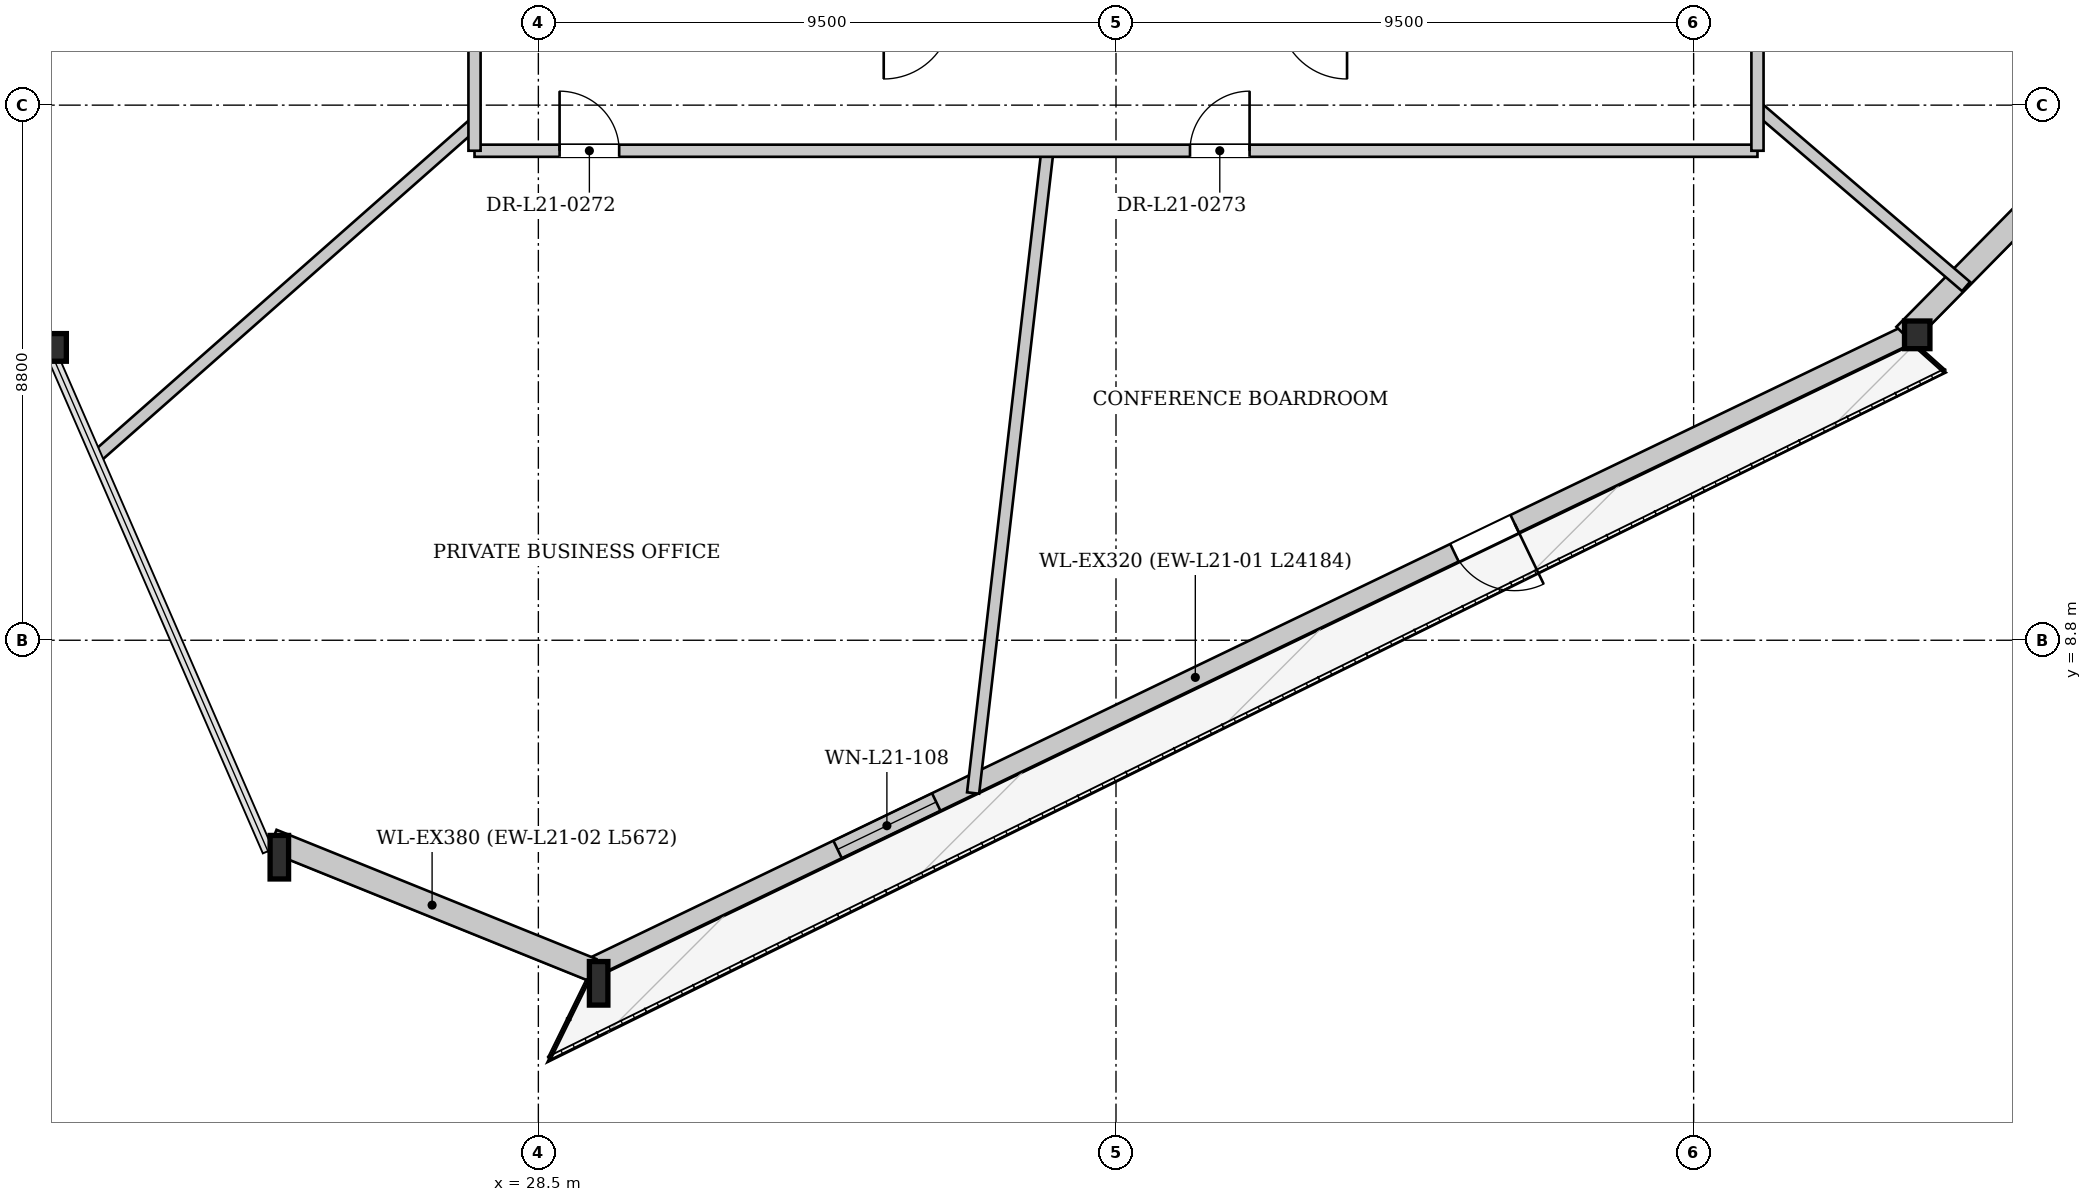
"""IFC4 building model, lengths in metres.
Left out: names, types, materials, properties, quantities, classifications, styles, units other than length and angle.
Written with IfcOpenShell. Run it as: python <this file> out.ifc"""

import sys

from ifc_helpers import new_model, si_unit, direction, frame, frame_2d, origin, origin_2d, place, context, subcontext, project, spatial, rectangle, i_section, extrude, source, transform, mapped, element, fill, save


model = new_model("IFC4")
c1 = context("Model", 3, precision=1e-05, world=origin(), true_north=direction((0.0, 1.0)))
c2 = subcontext(c1, "Body", "Model", "MODEL_VIEW")
j1 = project(units=[si_unit("LENGTHUNIT", "METRE"), si_unit("PLANEANGLEUNIT", "RADIAN")], contexts=[c1])
p1 = place(None, origin())
s1 = spatial("IfcSite", under=j1, at=p1, CompositionType="ELEMENT")
p2 = place(p1, origin())
s2 = spatial("IfcBuilding", under=s1, at=p2, CompositionType="ELEMENT")
p3 = place(p2, frame((0.0, 0.0, 84.4)))
s3 = spatial("IfcBuildingStorey", under=s2, at=p3, CompositionType="ELEMENT", Elevation=84.4)
m1 = source(origin(), c2, "Body", "SweptSolid", [
    extrude(i_section(OverallWidth=0.418, OverallDepth=0.455, WebThickness=0.038, FlangeThickness=0.059, at=origin_2d()), origin(), (0.0, 0.0, 1.0), 3.405),
])
p4 = place(p3, frame((20.393, 13.743, 0.0), z_axis=(0.079506863503, -0.07491855037, 0.994015024769), x_axis=(0.685794461716, 0.727795270855, 0.0)))
e1 = element("IfcColumn", 1, at=p4, inside=s3, PredefinedType="COLUMN", context=c2, shape_type="MappedRepresentation", body=[
    mapped(m1, transform((0.0, 0.0, 0.0), x_axis=(1.0, 0.0, 0.0), y_axis=(0.0, 1.0, 0.0), z_axis=(0.0, 0.0, 1.0), scale=1.0)),
])
m2 = source(origin(), c2, "Body", "SweptSolid", [
    extrude(i_section(OverallWidth=0.304, OverallDepth=0.716, WebThickness=0.021, FlangeThickness=0.04, at=origin_2d()), origin(), (0.0, 0.0, 1.0), 3.412),
])
p5 = place(p3, frame((24.052, 5.331, 0.0), z_axis=(0.110350236262, -0.057608262121, 0.9922218066), x_axis=(0.462782108562, 0.886472063855, 0.0)))
e2 = element("IfcColumn", 2, at=p5, inside=s3, PredefinedType="COLUMN", context=c2, shape_type="MappedRepresentation", body=[
    mapped(m2, transform((0.0, 0.0, 0.0), x_axis=(1.0, 0.0, 0.0), y_axis=(0.0, 1.0, 0.0), z_axis=(0.0, 0.0, 1.0), scale=1.0)),
])
m3 = source(origin(), c2, "Body", "SweptSolid", [
    extrude(i_section(OverallWidth=0.304, OverallDepth=0.716, WebThickness=0.021, FlangeThickness=0.04, at=origin_2d()), origin(), (0.0, 0.0, 1.0), 3.406),
])
p6 = place(p3, frame((29.311, 3.206, 0.0), z_axis=(0.106170006888, -0.027958340774, 0.993954858542), x_axis=(0.254653998103, 0.967032233822, 0.0)))
e3 = element("IfcColumn", 3, at=p6, inside=s3, PredefinedType="COLUMN", context=c2, shape_type="MappedRepresentation", body=[
    mapped(m3, transform((0.0, 0.0, 0.0), x_axis=(1.0, 0.0, 0.0), y_axis=(0.0, 1.0, 0.0), z_axis=(0.0, 0.0, 1.0), scale=1.0)),
])
m4 = source(origin(), c2, "Body", "SweptSolid", [
    extrude(i_section(OverallWidth=0.418, OverallDepth=0.455, WebThickness=0.038, FlangeThickness=0.059, at=origin_2d()), origin(), (0.0, 0.0, 1.0), 3.399),
])
p7 = place(p3, frame((51.105, 13.687, 0.0), z_axis=(0.042450582005, 0.079873176293, 0.995900709808), x_axis=(-0.883033453869, 0.469310046076, 0.0)))
e4 = element("IfcColumn", 4, at=p7, inside=s3, PredefinedType="COLUMN", context=c2, shape_type="MappedRepresentation", body=[
    mapped(m4, transform((0.0, 0.0, 0.0), x_axis=(1.0, 0.0, 0.0), y_axis=(0.0, 1.0, 0.0), z_axis=(0.0, 0.0, 1.0), scale=1.0)),
])
p8 = place(p3, frame((51.036, 13.831, 0.0), z_axis=(0.0, 0.0, 1.0), x_axis=(-0.901204126569, -0.433394880283, 0.0)))
e5 = element("IfcWall", 5, at=p8, inside=s3, PredefinedType="SOLIDWALL", context=c2, shape_type="SweptSolid", body=[
    extrude(rectangle(XDim=24.184, YDim=0.32, at=frame_2d((12.092, 0.0))), origin(), (0.0, 0.0, 1.0), 2.692),
])
p9 = place(p8, frame((7.189, 0.0, 0.0)))
e6 = element("IfcOpeningElement", 6, at=p9, cuts=e5, PredefinedType="OPENING", context=c2, shape_type="SweptSolid", body=[
    extrude(rectangle(XDim=1.1, YDim=2.3, at=frame_2d((0.55, 1.15))), frame((0.0, 0.17, 0.0), z_axis=(0.0, -1.0, 0.0), x_axis=(1.0, 0.0, 0.0)), (0.0, 0.0, 1.0), 0.34),
])
p10 = place(p8, frame((17.746, 0.0, 0.372)))
e7 = element("IfcOpeningElement", 7, at=p10, cuts=e5, PredefinedType="OPENING", context=c2, shape_type="SweptSolid", body=[
    extrude(rectangle(XDim=1.8, YDim=2.2, at=frame_2d((0.9, 1.1))), frame((0.0, 0.17, 0.0), z_axis=(0.0, -1.0, 0.0), x_axis=(1.0, 0.0, 0.0)), (0.0, 0.0, 1.0), 0.34),
])
p11 = place(p3, frame((29.382, 3.382, 0.0), z_axis=(0.0, 0.0, 1.0), x_axis=(-0.92720073145, 0.374564818954, 0.0)))
e8 = element("IfcWall", 8, at=p11, inside=s3, PredefinedType="SOLIDWALL", context=c2, shape_type="SweptSolid", body=[
    extrude(rectangle(XDim=5.672, YDim=0.38, at=frame_2d((2.836, 0.0))), origin(), (0.0, 0.0, 1.0), 2.692),
])
p12 = place(p3, frame((67.946, 31.045, 0.0), z_axis=(0.0, 0.0, 1.0), x_axis=(-0.701949653056, -0.712226568288, 0.0)))
e9 = element("IfcWall", 9, at=p12, inside=s3, PredefinedType="SOLIDWALL", context=c2, shape_type="SweptSolid", body=[
    extrude(rectangle(XDim=24.184, YDim=0.38, at=frame_2d((12.092, 0.0))), origin(), (0.0, 0.0, 1.0), 2.692),
])
p13 = place(p12, frame((5.671, 0.0, 0.322)))
e10 = element("IfcOpeningElement", 10, at=p13, cuts=e9, PredefinedType="OPENING", context=c2, shape_type="SweptSolid", body=[
    extrude(rectangle(XDim=2.2, YDim=2.25, at=frame_2d((1.1, 1.125))), frame((0.0, 0.2, 0.0), z_axis=(0.0, -1.0, 0.0), x_axis=(1.0, 0.0, 0.0)), (0.0, 0.0, 1.0), 0.4),
])
p14 = place(p12, frame((16.312, 0.0, 0.322)))
e11 = element("IfcOpeningElement", 11, at=p14, cuts=e9, PredefinedType="OPENING", context=c2, shape_type="SweptSolid", body=[
    extrude(rectangle(XDim=2.2, YDim=2.25, at=frame_2d((1.1, 1.125))), frame((0.0, 0.2, 0.0), z_axis=(0.0, -1.0, 0.0), x_axis=(1.0, 0.0, 0.0)), (0.0, 0.0, 1.0), 0.4),
])
p15 = place(p3, frame((27.45, 17.299, 0.0), z_axis=(0.0, 0.0, 1.0), x_axis=(-0.750110386314, -0.661312640393, 0.0)))
e12 = element("IfcWall", 12, at=p15, inside=s3, PredefinedType="PARTITIONING", context=c2, shape_type="SweptSolid", body=[
    extrude(rectangle(XDim=8.259, YDim=0.2, at=frame_2d((4.13, 0.0))), origin(), (0.0, 0.0, 1.0), 3.3),
])
p16 = place(p3, frame((36.872, 16.85, 0.0), z_axis=(0.0, 0.0, 1.0), x_axis=(-0.114918671234, -0.993374903549, 0.0)))
e13 = element("IfcWall", 13, at=p16, inside=s3, PredefinedType="PARTITIONING", context=c2, shape_type="SweptSolid", body=[
    extrude(rectangle(XDim=10.633, YDim=0.2, at=frame_2d((5.316, 0.0))), origin(), (0.0, 0.0, 1.0), 3.3),
])
p17 = place(p3, frame((48.55, 17.558, 0.0), z_axis=(0.0, 0.0, 1.0), x_axis=(0.75925278781, -0.650795823744, 0.0)))
e14 = element("IfcWall", 14, at=p17, inside=s3, PredefinedType="PARTITIONING", context=c2, shape_type="SweptSolid", body=[
    extrude(rectangle(XDim=4.518, YDim=0.2, at=frame_2d((2.259, 0.0))), origin(), (0.0, 0.0, 1.0), 3.3),
])
p18 = place(p3, frame((27.45, 16.85, 0.0), z_axis=(0.0, 0.0, 1.0), x_axis=(1.0, 0.0, 0.0)))
e15 = element("IfcWall", 15, at=p18, inside=s3, PredefinedType="PARTITIONING", context=c2, shape_type="SweptSolid", body=[
    extrude(rectangle(XDim=21.1, YDim=0.2, at=frame_2d((10.55, 0.0))), origin(), (0.0, 0.0, 1.0), 3.3),
])
p19 = place(p18, frame((1.399, 0.0, 0.0)))
e16 = element("IfcOpeningElement", 16, at=p19, cuts=e15, PredefinedType="OPENING", context=c2, shape_type="SweptSolid", body=[
    extrude(rectangle(XDim=0.98, YDim=2.15, at=frame_2d((0.49, 1.075))), frame((0.0, 0.11, 0.0), z_axis=(0.0, -1.0, 0.0), x_axis=(1.0, 0.0, 0.0)), (0.0, 0.0, 1.0), 0.22),
])
p20 = place(p18, frame((11.767, 0.0, 0.0)))
e17 = element("IfcOpeningElement", 17, at=p20, cuts=e15, PredefinedType="OPENING", context=c2, shape_type="SweptSolid", body=[
    extrude(rectangle(XDim=0.98, YDim=2.15, at=frame_2d((0.49, 1.075))), frame((0.0, 0.11, 0.0), z_axis=(0.0, -1.0, 0.0), x_axis=(1.0, 0.0, 0.0)), (0.0, 0.0, 1.0), 0.22),
])
p21 = place(p3, frame((27.45, 16.85, 0.0), z_axis=(0.0, 0.0, 1.0), x_axis=(0.0, 1.0, 0.0)))
e18 = element("IfcWall", 18, at=p21, inside=s3, PredefinedType="PARTITIONING", context=c2, shape_type="SweptSolid", body=[
    extrude(rectangle(XDim=19.5, YDim=0.2, at=frame_2d((9.75, 0.0))), origin(), (0.0, 0.0, 1.0), 3.3),
])
p22 = place(p21, frame((14.243, 0.0, 0.0)))
e19 = element("IfcOpeningElement", 19, at=p22, cuts=e18, PredefinedType="OPENING", context=c2, shape_type="SweptSolid", body=[
    extrude(rectangle(XDim=0.98, YDim=2.15, at=frame_2d((0.49, 1.075))), frame((0.0, 0.11, 0.0), z_axis=(0.0, -1.0, 0.0), x_axis=(1.0, 0.0, 0.0)), (0.0, 0.0, 1.0), 0.22),
])
p23 = place(p21, frame((2.375, 0.0, 0.0)))
e20 = element("IfcOpeningElement", 20, at=p23, cuts=e18, PredefinedType="OPENING", context=c2, shape_type="SweptSolid", body=[
    extrude(rectangle(XDim=0.98, YDim=2.15, at=frame_2d((0.49, 1.075))), frame((0.0, 0.11, 0.0), z_axis=(0.0, -1.0, 0.0), x_axis=(1.0, 0.0, 0.0)), (0.0, 0.0, 1.0), 0.22),
])
p24 = place(p3, frame((48.55, 16.85, 0.0), z_axis=(0.0, 0.0, 1.0), x_axis=(0.0, 1.0, 0.0)))
e21 = element("IfcWall", 21, at=p24, inside=s3, PredefinedType="PARTITIONING", context=c2, shape_type="SweptSolid", body=[
    extrude(rectangle(XDim=19.5, YDim=0.2, at=frame_2d((9.75, 0.0))), origin(), (0.0, 0.0, 1.0), 3.3),
])
p25 = place(p24, frame((4.972, 0.0, 0.0)))
e22 = element("IfcOpeningElement", 22, at=p25, cuts=e21, PredefinedType="OPENING", context=c2, shape_type="SweptSolid", body=[
    extrude(rectangle(XDim=0.98, YDim=2.15, at=frame_2d((0.49, 1.075))), frame((0.0, 0.11, 0.0), z_axis=(0.0, -1.0, 0.0), x_axis=(1.0, 0.0, 0.0)), (0.0, 0.0, 1.0), 0.22),
])
m5 = source(origin(), c2, "Body", "SweptSolid", [
    extrude(rectangle(XDim=1.1, YDim=2.3, at=frame_2d((0.55, 1.15))), frame((0.0, 0.025, 0.0), z_axis=(0.0, -1.0, 0.0), x_axis=(1.0, 0.0, 0.0)), (0.0, 0.0, 1.0), 0.05),
])
p26 = place(p9, origin())
e23 = element("IfcDoor", 23, at=p26, inside=s3, OperationType="SINGLE_SWING_LEFT", PredefinedType="DOOR", context=c2, shape_type="MappedRepresentation", body=[
    mapped(m5, transform((0.0, 0.0, 0.0), x_axis=(1.0, 0.0, 0.0), y_axis=(0.0, 1.0, 0.0), z_axis=(0.0, 0.0, 1.0), scale=1.0)),
])
fill(e6, e23)
m6 = source(origin(), c2, "Body", "SweptSolid", [
    extrude(rectangle(XDim=1.8, YDim=2.2, at=frame_2d((0.9, 1.1))), frame((0.0, 0.03, 0.0), z_axis=(0.0, -1.0, 0.0), x_axis=(1.0, 0.0, 0.0)), (0.0, 0.0, 1.0), 0.06),
])
p27 = place(p10, origin())
e24 = element("IfcWindow", 24, at=p27, inside=s3, PartitioningType="SINGLE_PANEL", PredefinedType="WINDOW", context=c2, shape_type="MappedRepresentation", body=[
    mapped(m6, transform((0.0, 0.0, 0.0), x_axis=(1.0, 0.0, 0.0), y_axis=(0.0, 1.0, 0.0), z_axis=(0.0, 0.0, 1.0), scale=1.0)),
])
fill(e7, e24)
m7 = source(origin(), c2, "Body", "SweptSolid", [
    extrude(rectangle(XDim=0.98, YDim=2.15, at=frame_2d((0.49, 1.075))), frame((0.0, 0.025, 0.0), z_axis=(0.0, -1.0, 0.0), x_axis=(1.0, 0.0, 0.0)), (0.0, 0.0, 1.0), 0.05),
])
p28 = place(p19, origin())
e25 = element("IfcDoor", 25, at=p28, inside=s3, OperationType="SINGLE_SWING_LEFT", PredefinedType="DOOR", context=c2, shape_type="MappedRepresentation", body=[
    mapped(m7, transform((0.0, 0.0, 0.0), x_axis=(1.0, 0.0, 0.0), y_axis=(0.0, 1.0, 0.0), z_axis=(0.0, 0.0, 1.0), scale=1.0)),
])
fill(e16, e25)
p29 = place(p20, origin())
e26 = element("IfcDoor", 26, at=p29, inside=s3, OperationType="SINGLE_SWING_RIGHT", PredefinedType="DOOR", context=c2, shape_type="MappedRepresentation", body=[
    mapped(m7, transform((0.0, 0.0, 0.0), x_axis=(1.0, 0.0, 0.0), y_axis=(0.0, 1.0, 0.0), z_axis=(0.0, 0.0, 1.0), scale=1.0)),
])
fill(e17, e26)
save(model, sys.argv[1])
